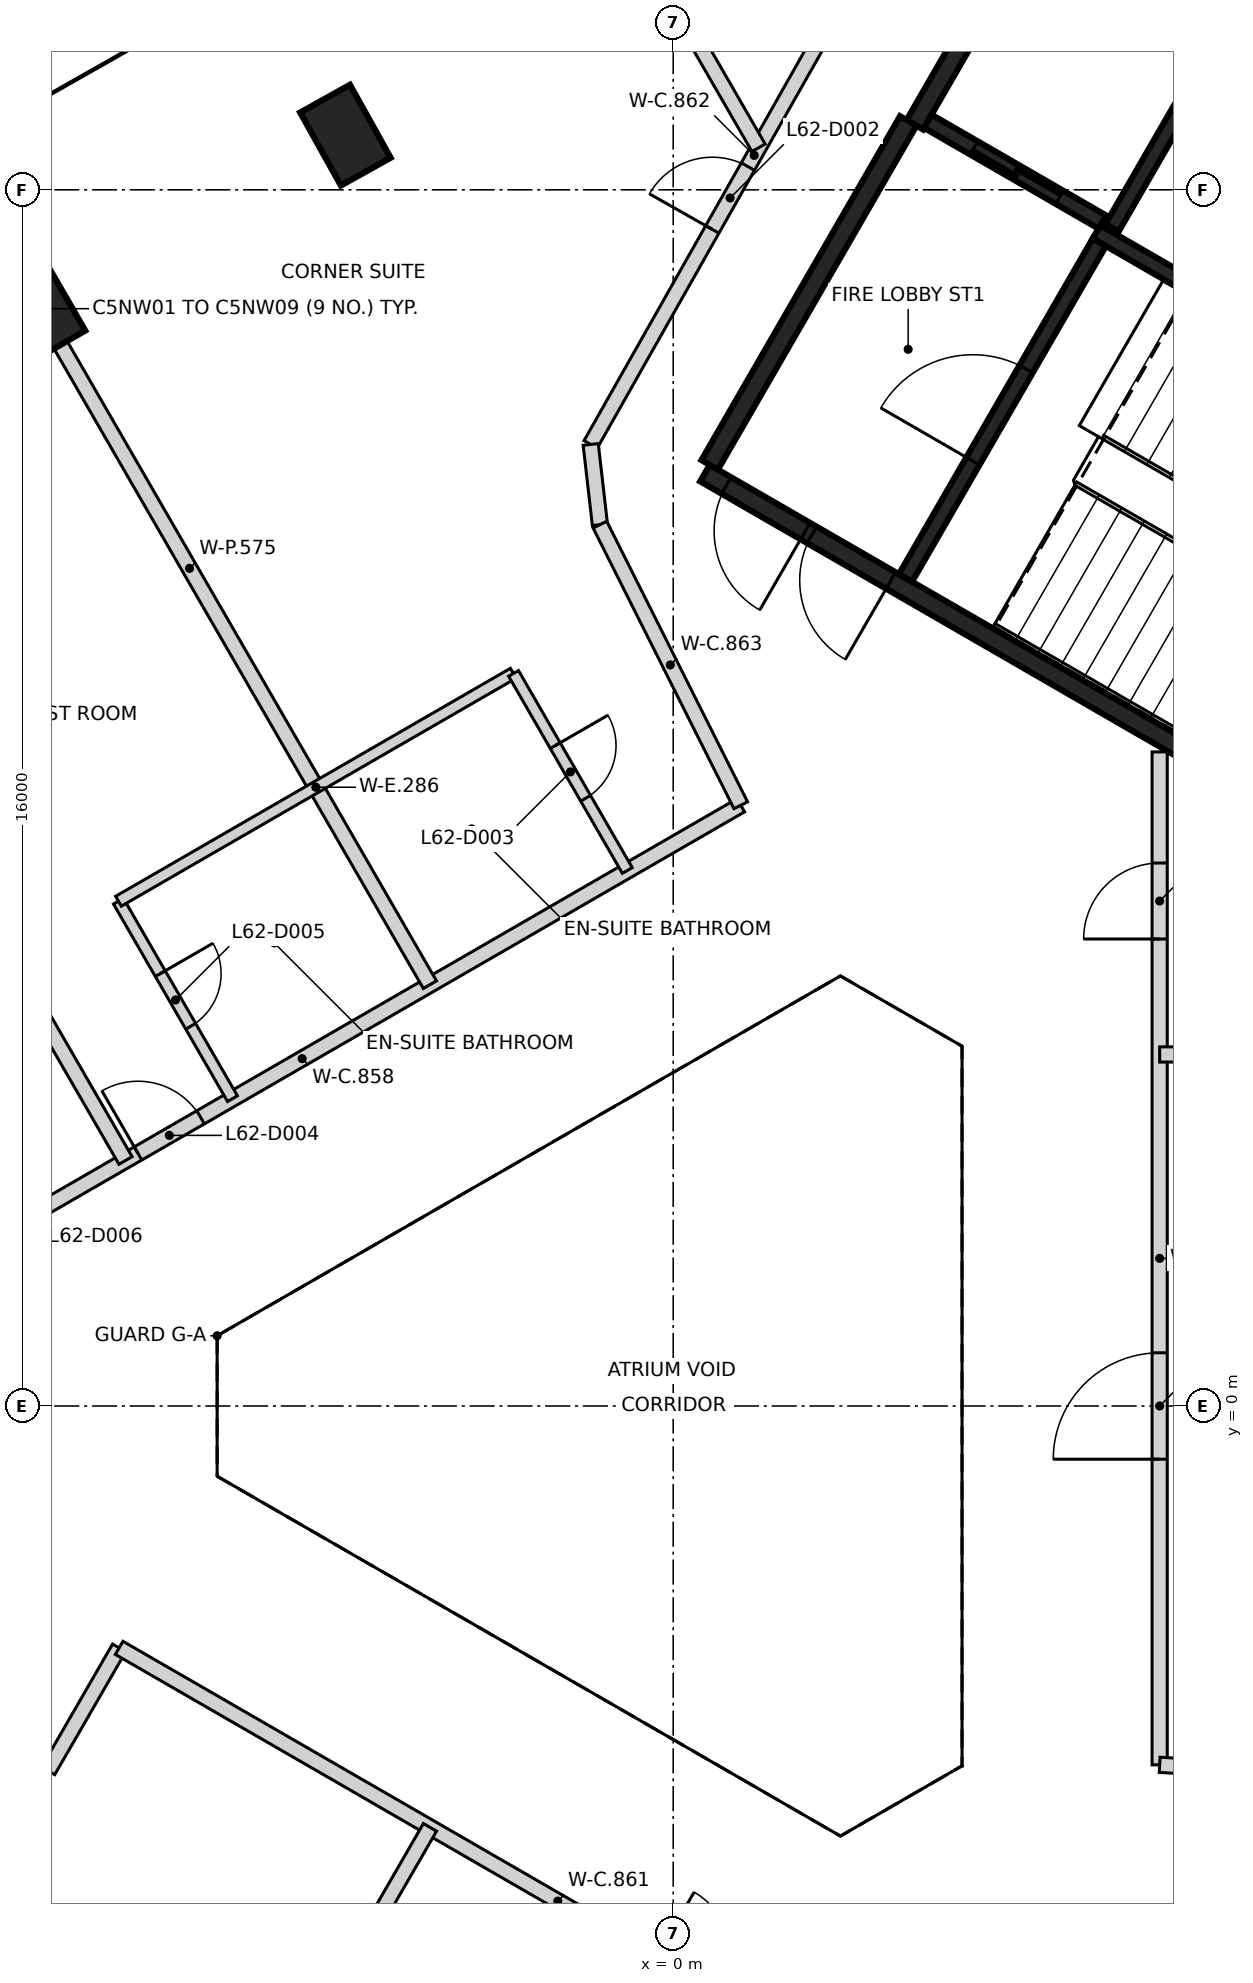
"""IFC4 building model, lengths in metres.
Left out: names, types, materials, properties, quantities, classifications, styles, units other than length and angle.
Written with IfcOpenShell. Run it as: python <this file> out.ifc"""

import sys

from ifc_helpers import new_model, si_unit, direction, frame, frame_2d, origin, origin_2d, place, context, subcontext, project, spatial, rectangle, extrude, element, fill, save


model = new_model("IFC4")
c1 = context("Model", 3, precision=1e-05, world=origin(), true_north=direction((0.0, 1.0)))
c2 = subcontext(c1, "Body", "Model", "MODEL_VIEW")
j1 = project(units=[si_unit("LENGTHUNIT", "METRE"), si_unit("PLANEANGLEUNIT", "RADIAN")], contexts=[c1])
p1 = place(None, origin())
s1 = spatial("IfcSite", under=j1, at=p1, CompositionType="ELEMENT")
p2 = place(p1, origin())
s2 = spatial("IfcBuilding", under=s1, at=p2, CompositionType="ELEMENT")
p3 = place(p2, frame((0.0, 0.0, 246.6)))
s3 = spatial("IfcBuildingStorey", under=s2, at=p3, CompositionType="ELEMENT", Elevation=246.6)
for number, where, z_axis, x_axis in (
    (1, (-4.312, 16.719, -0.35), (0.0, 0.0, 1.0), (-0.487, 0.873, 0.0)),
    (2, (-8.335, 14.436, -0.35), (0.0, 0.0, 1.0), (-0.5, 0.866, 0.0)),
):
    element("IfcColumn", number, at=place(p3, frame(where, z_axis=z_axis, x_axis=x_axis)), inside=s3, PredefinedType="COLUMN", context=c2, shape_type="SweptSolid", body=[
        extrude(rectangle(XDim=1.1, YDim=0.75, at=origin_2d()), origin(), (0.0, 0.0, 1.0), 3.6),
    ])
p4 = place(p3, frame((10.42, 6.498, 0.0), z_axis=(0.0, 0.0, 1.0), x_axis=(-0.866021906294, 0.500006057782, 0.0)))
e3 = element("IfcWall", 3, at=p4, inside=s3, PredefinedType="SHEAR", context=c2, shape_type="SweptSolid", body=[
    extrude(rectangle(XDim=11.55, YDim=0.25, at=frame_2d((5.775, 0.0))), origin(), (0.0, 0.0, 1.0), 3.25),
])
p5 = place(p4, frame((10.025, 0.0, 0.0)))
e4 = element("IfcOpeningElement", 4, at=p5, cuts=e3, PredefinedType="OPENING", context=c2, shape_type="SweptSolid", body=[
    extrude(rectangle(XDim=1.2, YDim=2.1, at=frame_2d((0.6, 1.05))), frame((0.0, 0.135, 0.0), z_axis=(0.0, -1.0, 0.0), x_axis=(1.0, 0.0, 0.0)), (0.0, 0.0, 1.0), 0.27),
])
p6 = place(p4, frame((8.725, 0.0, 0.0)))
e5 = element("IfcOpeningElement", 5, at=p6, cuts=e3, PredefinedType="OPENING", context=c2, shape_type="SweptSolid", body=[
    extrude(rectangle(XDim=1.2, YDim=2.1, at=frame_2d((0.6, 1.05))), frame((0.0, 0.135, 0.0), z_axis=(0.0, -1.0, 0.0), x_axis=(1.0, 0.0, 0.0)), (0.0, 0.0, 1.0), 0.27),
])
p7 = place(p3, frame((6.304, 22.269, 0.0), z_axis=(0.0, 0.0, 1.0), x_axis=(0.866022959057, -0.500004234368, 0.0)))
e6 = element("IfcWall", 6, at=p7, inside=s3, PredefinedType="SHEAR", context=c2, shape_type="SweptSolid", body=[
    extrude(rectangle(XDim=8.75, YDim=0.25, at=frame_2d((4.375, 0.0))), origin(), (0.0, 0.0, 1.0), 3.25),
])
p8 = place(p3, frame((3.179, 16.856, 0.0), z_axis=(0.0, 0.0, 1.0), x_axis=(0.500001955336, 0.866024274868, 0.0)))
e7 = element("IfcWall", 7, at=p8, inside=s3, PredefinedType="SHEAR", context=c2, shape_type="SweptSolid", body=[
    extrude(rectangle(XDim=6.125, YDim=0.25, at=frame_2d((3.062, 0.0))), origin(), (0.0, 0.0, 1.0), 3.25),
])
p9 = place(p8, frame((3.563, 0.0, 0.0)))
e8 = element("IfcOpeningElement", 8, at=p9, cuts=e7, PredefinedType="OPENING", context=c2, shape_type="SweptSolid", body=[
    extrude(rectangle(XDim=1.0, YDim=2.1, at=frame_2d((0.5, 1.05))), frame((0.0, 0.135, 0.0), z_axis=(0.0, -1.0, 0.0), x_axis=(1.0, 0.0, 0.0)), (0.0, 0.0, 1.0), 0.27),
])
p10 = place(p3, frame((0.48, 12.381, 0.0), z_axis=(0.0, 0.0, 1.0), x_axis=(0.49999885962, 0.866026062182, 0.0)))
e9 = element("IfcWall", 9, at=p10, inside=s3, PredefinedType="SHEAR", context=c2, shape_type="SweptSolid", body=[
    extrude(rectangle(XDim=5.225, YDim=0.25, at=frame_2d((2.612, 0.0))), origin(), (0.0, 0.0, 1.0), 3.25),
])
p11 = place(p3, frame((10.743, 12.46, 0.0), z_axis=(0.0, 0.0, 1.0), x_axis=(-0.866018848283, 0.500011354289, 0.0)))
e10 = element("IfcWall", 10, at=p11, inside=s3, PredefinedType="SHEAR", context=c2, shape_type="SweptSolid", body=[
    extrude(rectangle(XDim=5.974, YDim=0.2, at=frame_2d((2.987, 0.0))), origin(), (0.0, 0.0, 1.0), 3.25),
])
p12 = place(p3, frame((3.057, 10.895, 0.0), z_axis=(0.0, 0.0, 1.0), x_axis=(0.500027839223, 0.866009330205, 0.0)))
e11 = element("IfcWall", 11, at=p12, inside=s3, PredefinedType="SHEAR", context=c2, shape_type="SweptSolid", body=[
    extrude(rectangle(XDim=5.098, YDim=0.2, at=frame_2d((2.549, 0.0))), origin(), (0.0, 0.0, 1.0), 3.25),
])
p13 = place(p12, frame((1.774, 0.0, 0.0)))
e12 = element("IfcOpeningElement", 12, at=p13, cuts=e11, PredefinedType="OPENING", context=c2, shape_type="SweptSolid", body=[
    extrude(rectangle(XDim=1.4, YDim=2.1, at=frame_2d((0.7, 1.05))), frame((0.0, 0.11, 0.0), z_axis=(0.0, -1.0, 0.0), x_axis=(1.0, 0.0, 0.0)), (0.0, 0.0, 1.0), 0.22),
])
p14 = place(p3, frame((7.324, 18.187, 0.0), z_axis=(0.0, 0.0, 1.0), x_axis=(-0.499967891604, -0.866043940782, 0.0)))
e13 = element("IfcWall", 13, at=p14, inside=s3, PredefinedType="SHEAR", context=c2, shape_type="SweptSolid", body=[
    extrude(rectangle(XDim=3.1, YDim=0.2, at=frame_2d((1.55, 0.0))), origin(), (0.0, 0.0, 1.0), 3.25),
])
p15 = place(p3, frame((5.646, 15.576, 0.0), z_axis=(0.0, 0.0, 1.0), x_axis=(-0.866018407898, 0.500012117035, 0.0)))
e14 = element("IfcWall", 14, at=p15, inside=s3, PredefinedType="SHEAR", context=c2, shape_type="SweptSolid", body=[
    extrude(rectangle(XDim=2.651, YDim=0.2, at=frame_2d((1.325, 0.0))), origin(), (0.0, 0.0, 1.0), 3.25),
])
p16 = place(p15, frame((0.652, 0.0, 0.0)))
e15 = element("IfcOpeningElement", 15, at=p16, cuts=e14, PredefinedType="OPENING", context=c2, shape_type="SweptSolid", body=[
    extrude(rectangle(XDim=1.3, YDim=2.1, at=frame_2d((0.65, 1.05))), frame((0.0, 0.11, 0.0), z_axis=(0.0, -1.0, 0.0), x_axis=(1.0, 0.0, 0.0)), (0.0, 0.0, 1.0), 0.22),
])
p17 = place(p3, frame((0.417, -12.273, 0.0), z_axis=(0.0, 0.0, 1.0), x_axis=(0.866021906294, 0.500006057782, 0.0)))
e16 = element("IfcWall", 16, at=p17, inside=s3, PredefinedType="SHEAR", context=c2, shape_type="SweptSolid", body=[
    extrude(rectangle(XDim=11.55, YDim=0.25, at=frame_2d((5.775, 0.0))), origin(), (0.0, 0.0, 1.0), 3.25),
])
p18 = place(p17, frame((10.025, 0.0, 0.0)))
e17 = element("IfcOpeningElement", 17, at=p18, cuts=e16, PredefinedType="OPENING", context=c2, shape_type="SweptSolid", body=[
    extrude(rectangle(XDim=1.2, YDim=2.1, at=frame_2d((0.6, 1.05))), frame((0.0, 0.135, 0.0), z_axis=(0.0, -1.0, 0.0), x_axis=(1.0, 0.0, 0.0)), (0.0, 0.0, 1.0), 0.27),
])
p19 = place(p17, frame((8.725, 0.0, 0.0)))
e18 = element("IfcOpeningElement", 18, at=p19, cuts=e16, PredefinedType="OPENING", context=c2, shape_type="SweptSolid", body=[
    extrude(rectangle(XDim=1.2, YDim=2.1, at=frame_2d((0.6, 1.05))), frame((0.0, 0.135, 0.0), z_axis=(0.0, -1.0, 0.0), x_axis=(1.0, 0.0, 0.0)), (0.0, 0.0, 1.0), 0.27),
])
p20 = place(p3, frame((-10.652, 1.237, 0.0), z_axis=(0.0, 0.0, 1.0), x_axis=(0.865922902183, 0.50017749597, 0.0)))
e19 = element("IfcWall", 19, at=p20, inside=s3, PredefinedType="PARTITIONING", context=c2, shape_type="SweptSolid", body=[
    extrude(rectangle(XDim=13.328, YDim=0.2, at=frame_2d((6.664, 0.0))), origin(), (0.0, 0.0, 1.0), 3.25),
])
p21 = place(p20, frame((4.171, 0.0, 0.0)))
e20 = element("IfcOpeningElement", 20, at=p21, cuts=e19, PredefinedType="OPENING", context=c2, shape_type="SweptSolid", body=[
    extrude(rectangle(XDim=0.95, YDim=2.1, at=frame_2d((0.475, 1.05))), frame((0.0, 0.11, 0.0), z_axis=(0.0, -1.0, 0.0), x_axis=(1.0, 0.0, 0.0)), (0.0, 0.0, 1.0), 0.22),
])
p22 = place(p20, frame((1.463, 0.0, 0.0)))
e21 = element("IfcOpeningElement", 21, at=p22, cuts=e19, PredefinedType="OPENING", context=c2, shape_type="SweptSolid", body=[
    extrude(rectangle(XDim=1.0, YDim=2.1, at=frame_2d((0.5, 1.05))), frame((0.0, 0.11, 0.0), z_axis=(0.0, -1.0, 0.0), x_axis=(1.0, 0.0, 0.0)), (0.0, 0.0, 1.0), 0.22),
])
p23 = place(p3, frame((-8.223, -4.8, 0.0), z_axis=(0.0, 0.0, 1.0), x_axis=(0.499835576036, 0.866120313195, 0.0)))
e22 = element("IfcWall", 22, at=p23, inside=s3, PredefinedType="PARTITIONING", context=c2, shape_type="SweptSolid", body=[
    extrude(rectangle(XDim=1.868, YDim=0.2, at=frame_2d((0.934, 0.0))), origin(), (0.0, 0.0, 1.0), 3.25),
])
p24 = place(p3, frame((-7.289, -3.182, 0.0), z_axis=(0.0, 0.0, 1.0), x_axis=(0.865979329032, -0.500079795322, 0.0)))
e23 = element("IfcWall", 23, at=p24, inside=s3, PredefinedType="PARTITIONING", context=c2, shape_type="SweptSolid", body=[
    extrude(rectangle(XDim=13.326, YDim=0.2, at=frame_2d((6.663, 0.0))), origin(), (0.0, 0.0, 1.0), 3.25),
])
p25 = place(p24, frame((8.158, 0.0, 0.0)))
e24 = element("IfcOpeningElement", 24, at=p25, cuts=e23, PredefinedType="OPENING", context=c2, shape_type="SweptSolid", body=[
    extrude(rectangle(XDim=1.0, YDim=2.1, at=frame_2d((0.5, 1.05))), frame((0.0, 0.11, 0.0), z_axis=(0.0, -1.0, 0.0), x_axis=(1.0, 0.0, 0.0)), (0.0, 0.0, 1.0), 0.22),
])
p26 = place(p24, frame((10.865, 0.0, 0.0)))
e25 = element("IfcOpeningElement", 25, at=p26, cuts=e23, PredefinedType="OPENING", context=c2, shape_type="SweptSolid", body=[
    extrude(rectangle(XDim=1.0, YDim=2.1, at=frame_2d((0.5, 1.05))), frame((0.0, 0.11, 0.0), z_axis=(0.0, -1.0, 0.0), x_axis=(1.0, 0.0, 0.0)), (0.0, 0.0, 1.0), 0.22),
])
p27 = place(p3, frame((-1.086, 12.651, 0.0), z_axis=(0.0, 0.0, 1.0), x_axis=(0.492590234691, 0.870261374925, 0.0)))
e26 = element("IfcWall", 26, at=p27, inside=s3, PredefinedType="PARTITIONING", context=c2, shape_type="SweptSolid", body=[
    extrude(rectangle(XDim=8.738, YDim=0.2, at=frame_2d((4.369, 0.0))), origin(), (0.0, 0.0, 1.0), 3.25),
])
p28 = place(p27, frame((6.105, 0.0, 0.0)))
e27 = element("IfcOpeningElement", 27, at=p28, cuts=e26, PredefinedType="OPENING", context=c2, shape_type="SweptSolid", body=[
    extrude(rectangle(XDim=1.0, YDim=2.1, at=frame_2d((0.5, 1.05))), frame((0.0, 0.11, 0.0), z_axis=(0.0, -1.0, 0.0), x_axis=(1.0, 0.0, 0.0)), (0.0, 0.0, 1.0), 0.22),
])
p29 = place(p27, frame((3.25, 0.0, 0.0)))
e28 = element("IfcOpeningElement", 28, at=p29, cuts=e26, PredefinedType="OPENING", context=c2, shape_type="SweptSolid", body=[
    extrude(rectangle(XDim=0.95, YDim=2.1, at=frame_2d((0.475, 1.05))), frame((0.0, 0.11, 0.0), z_axis=(0.0, -1.0, 0.0), x_axis=(1.0, 0.0, 0.0)), (0.0, 0.0, 1.0), 0.22),
])
p30 = place(p3, frame((-1.085, 12.65, 0.0), z_axis=(0.0, 0.0, 1.0), x_axis=(0.113812454263, -0.993502252264, 0.0)))
e29 = element("IfcWall", 29, at=p30, inside=s3, PredefinedType="PARTITIONING", context=c2, shape_type="SweptSolid", body=[
    extrude(rectangle(XDim=1.062, YDim=0.2, at=frame_2d((0.531, 0.0))), origin(), (0.0, 0.0, 1.0), 3.25),
])
p31 = place(p3, frame((-0.964, 11.595, 0.0), z_axis=(0.0, 0.0, 1.0), x_axis=(0.448584236569, -0.893740556706, 0.0)))
e30 = element("IfcWall", 30, at=p31, inside=s3, PredefinedType="PARTITIONING", context=c2, shape_type="SweptSolid", body=[
    extrude(rectangle(XDim=4.131, YDim=0.2, at=frame_2d((2.065, 0.0))), origin(), (0.0, 0.0, 1.0), 3.25),
])
p32 = place(p3, frame((6.4, -4.721, 0.0), z_axis=(0.0, 0.0, 1.0), x_axis=(0.0, 1.0, 0.0)))
e31 = element("IfcWall", 31, at=p32, inside=s3, PredefinedType="PARTITIONING", context=c2, shape_type="SweptSolid", body=[
    extrude(rectangle(XDim=13.326, YDim=0.2, at=frame_2d((6.663, 0.0))), origin(), (0.0, 0.0, 1.0), 3.25),
])
p33 = place(p32, frame((4.021, 0.0, 0.0)))
e32 = element("IfcOpeningElement", 32, at=p33, cuts=e31, PredefinedType="OPENING", context=c2, shape_type="SweptSolid", body=[
    extrude(rectangle(XDim=1.4, YDim=2.1, at=frame_2d((0.7, 1.05))), frame((0.0, 0.11, 0.0), z_axis=(0.0, -1.0, 0.0), x_axis=(1.0, 0.0, 0.0)), (0.0, 0.0, 1.0), 0.22),
])
p34 = place(p32, frame((10.865, 0.0, 0.0)))
e33 = element("IfcOpeningElement", 33, at=p34, cuts=e31, PredefinedType="OPENING", context=c2, shape_type="SweptSolid", body=[
    extrude(rectangle(XDim=1.0, YDim=2.1, at=frame_2d((0.5, 1.05))), frame((0.0, 0.11, 0.0), z_axis=(0.0, -1.0, 0.0), x_axis=(1.0, 0.0, 0.0)), (0.0, 0.0, 1.0), 0.22),
])
p35 = place(p3, frame((6.4, -4.721, 0.0), z_axis=(0.0, 0.0, 1.0), x_axis=(0.998447007366, -0.055709725208, 0.0)))
e34 = element("IfcWall", 34, at=p35, inside=s3, PredefinedType="PARTITIONING", context=c2, shape_type="SweptSolid", body=[
    extrude(rectangle(XDim=4.4, YDim=0.2, at=frame_2d((2.2, 0.0))), origin(), (0.0, 0.0, 1.0), 3.25),
])
p36 = place(p3, frame((-13.513, 14.156, 0.0), z_axis=(0.0, 0.0, 1.0), x_axis=(0.500012240511, -0.866018336607, 0.0)))
e35 = element("IfcWall", 35, at=p36, inside=s3, PredefinedType="PARTITIONING", context=c2, shape_type="SweptSolid", body=[
    extrude(rectangle(XDim=12.616, YDim=0.2, at=frame_2d((6.308, 0.0))), origin(), (0.0, 0.0, 1.0), 3.25),
])
for number, where, z_axis, x_axis in (
    (36, (-9.525, 16.498, 0.0), (0.0, 0.0, 1.0), (0.5, -0.866, 0.0)),
    (37, (-9.525, -16.498, 0.0), (0.0, 0.0, 1.0), (0.5, 0.866, 0.0)),
):
    element("IfcWall", number, at=place(p3, frame(where, z_axis=z_axis, x_axis=x_axis)), inside=s3, PredefinedType="PARTITIONING", context=c2, shape_type="SweptSolid", body=[
        extrude(rectangle(XDim=12.65, YDim=0.2, at=frame_2d((6.325, 0.0))), origin(), (0.0, 0.0, 1.0), 3.25),
    ])
p37 = place(p3, frame((-1.447, 21.005, 0.0), z_axis=(0.0, 0.0, 1.0), x_axis=(0.49988826685, -0.866089903339, 0.0)))
e38 = element("IfcWall", 38, at=p37, inside=s3, PredefinedType="PARTITIONING", context=c2, shape_type="SweptSolid", body=[
    extrude(rectangle(XDim=5.141, YDim=0.2, at=frame_2d((2.57, 0.0))), origin(), (0.0, 0.0, 1.0), 3.25),
])
p38 = place(p3, frame((6.4, 4.625, 0.0), z_axis=(0.0, 0.0, 1.0), x_axis=(1.0, 0.0, 0.0)))
e39 = element("IfcWall", 39, at=p38, inside=s3, PredefinedType="PARTITIONING", context=c2, shape_type="SweptSolid", body=[
    extrude(rectangle(XDim=12.616, YDim=0.2, at=frame_2d((6.308, 0.0))), origin(), (0.0, 0.0, 1.0), 3.25),
])
p39 = place(p3, frame((-7.298, 6.641, 0.0), z_axis=(0.0, 0.0, 1.0), x_axis=(0.499990139034, -0.866031096941, 0.0)))
e40 = element("IfcWall", 40, at=p39, inside=s3, PredefinedType="PARTITIONING", context=c2, shape_type="SweptSolid", body=[
    extrude(rectangle(XDim=3.0, YDim=0.15, at=frame_2d((1.5, 0.0))), origin(), (0.0, 0.0, 1.0), 3.25),
])
p40 = place(p39, frame((1.1, 0.0, 0.0)))
e41 = element("IfcOpeningElement", 41, at=p40, cuts=e40, PredefinedType="OPENING", context=c2, shape_type="SweptSolid", body=[
    extrude(rectangle(XDim=0.8, YDim=2.1, at=frame_2d((0.4, 1.05))), frame((0.0, 0.085, 0.0), z_axis=(0.0, -1.0, 0.0), x_axis=(1.0, 0.0, 0.0)), (0.0, 0.0, 1.0), 0.17),
])
p41 = place(p3, frame((-7.298, 6.641, 0.0), z_axis=(0.0, 0.0, 1.0), x_axis=(0.865999837459, 0.50004427956, 0.0)))
e42 = element("IfcWall", 42, at=p41, inside=s3, PredefinedType="PARTITIONING", context=c2, shape_type="SweptSolid", body=[
    extrude(rectangle(XDim=5.998, YDim=0.15, at=frame_2d((2.999, 0.0))), origin(), (0.0, 0.0, 1.0), 3.25),
])
p42 = place(p3, frame((-2.1, 9.638, 0.0), z_axis=(0.0, 0.0, 1.0), x_axis=(0.499753046638, -0.866167935435, 0.0)))
e43 = element("IfcWall", 43, at=p42, inside=s3, PredefinedType="PARTITIONING", context=c2, shape_type="SweptSolid", body=[
    extrude(rectangle(XDim=2.994, YDim=0.15, at=frame_2d((1.497, 0.0))), origin(), (0.0, 0.0, 1.0), 3.25),
])
p43 = place(p42, frame((1.096, 0.0, 0.0)))
e44 = element("IfcOpeningElement", 44, at=p43, cuts=e43, PredefinedType="OPENING", context=c2, shape_type="SweptSolid", body=[
    extrude(rectangle(XDim=0.8, YDim=2.1, at=frame_2d((0.4, 1.05))), frame((0.0, 0.085, 0.0), z_axis=(0.0, -1.0, 0.0), x_axis=(1.0, 0.0, 0.0)), (0.0, 0.0, 1.0), 0.17),
])
p44 = place(p16, origin())
e45 = element("IfcDoor", 45, at=p44, inside=s3, OperationType="SLIDING_TO_LEFT", PredefinedType="DOOR", context=c2, shape_type="SweptSolid", body=[
    extrude(rectangle(XDim=1.3, YDim=2.1, at=frame_2d((0.65, 1.05))), frame((0.0, 0.025, 0.0), z_axis=(0.0, -1.0, 0.0), x_axis=(1.0, 0.0, 0.0)), (0.0, 0.0, 1.0), 0.05),
])
fill(e15, e45)
p45 = place(p5, origin())
e46 = element("IfcDoor", 46, at=p45, inside=s3, OperationType="SINGLE_SWING_LEFT", PredefinedType="DOOR", context=c2, shape_type="SweptSolid", body=[
    extrude(rectangle(XDim=1.2, YDim=2.1, at=frame_2d((0.6, 1.05))), frame((0.0, 0.025, 0.0), z_axis=(0.0, -1.0, 0.0), x_axis=(1.0, 0.0, 0.0)), (0.0, 0.0, 1.0), 0.05),
])
fill(e4, e46)
p46 = place(p6, origin())
e47 = element("IfcDoor", 47, at=p46, inside=s3, OperationType="SINGLE_SWING_RIGHT", PredefinedType="DOOR", context=c2, shape_type="SweptSolid", body=[
    extrude(rectangle(XDim=1.2, YDim=2.1, at=frame_2d((0.6, 1.05))), frame((0.0, 0.025, 0.0), z_axis=(0.0, -1.0, 0.0), x_axis=(1.0, 0.0, 0.0)), (0.0, 0.0, 1.0), 0.05),
])
fill(e5, e47)
p47 = place(p13, origin())
e48 = element("IfcDoor", 48, at=p47, inside=s3, OperationType="SINGLE_SWING_LEFT", PredefinedType="DOOR", context=c2, shape_type="SweptSolid", body=[
    extrude(rectangle(XDim=1.4, YDim=2.1, at=frame_2d((0.7, 1.05))), frame((0.0, 0.025, 0.0), z_axis=(0.0, -1.0, 0.0), x_axis=(1.0, 0.0, 0.0)), (0.0, 0.0, 1.0), 0.05),
])
fill(e12, e48)
p48 = place(p29, origin())
e49 = element("IfcDoor", 49, at=p48, inside=s3, OperationType="SINGLE_SWING_LEFT", PredefinedType="DOOR", context=c2, shape_type="SweptSolid", body=[
    extrude(rectangle(XDim=0.95, YDim=2.1, at=frame_2d((0.475, 1.05))), frame((0.0, 0.025, 0.0), z_axis=(0.0, -1.0, 0.0), x_axis=(1.0, 0.0, 0.0)), (0.0, 0.0, 1.0), 0.05),
])
fill(e28, e49)
p49 = place(p43, origin())
e50 = element("IfcDoor", 50, at=p49, inside=s3, OperationType="SINGLE_SWING_LEFT", PredefinedType="DOOR", context=c2, shape_type="SweptSolid", body=[
    extrude(rectangle(XDim=0.8, YDim=2.1, at=frame_2d((0.4, 1.05))), frame((0.0, 0.025, 0.0), z_axis=(0.0, -1.0, 0.0), x_axis=(1.0, 0.0, 0.0)), (0.0, 0.0, 1.0), 0.05),
])
fill(e44, e50)
p50 = place(p21, origin())
e51 = element("IfcDoor", 51, at=p50, inside=s3, OperationType="SINGLE_SWING_LEFT", PredefinedType="DOOR", context=c2, shape_type="SweptSolid", body=[
    extrude(rectangle(XDim=0.95, YDim=2.1, at=frame_2d((0.475, 1.05))), frame((0.0, 0.025, 0.0), z_axis=(0.0, -1.0, 0.0), x_axis=(1.0, 0.0, 0.0)), (0.0, 0.0, 1.0), 0.05),
])
fill(e20, e51)
p51 = place(p40, origin())
e52 = element("IfcDoor", 52, at=p51, inside=s3, OperationType="SINGLE_SWING_LEFT", PredefinedType="DOOR", context=c2, shape_type="SweptSolid", body=[
    extrude(rectangle(XDim=0.8, YDim=2.1, at=frame_2d((0.4, 1.05))), frame((0.0, 0.025, 0.0), z_axis=(0.0, -1.0, 0.0), x_axis=(1.0, 0.0, 0.0)), (0.0, 0.0, 1.0), 0.05),
])
fill(e41, e52)
p52 = place(p33, frame((1.4, 0.0, 0.0), z_axis=(0.0, 0.0, 1.0), x_axis=(-1.0, 0.0, 0.0)))
e53 = element("IfcDoor", 53, at=p52, inside=s3, OperationType="DOUBLE_DOOR_SINGLE_SWING", PredefinedType="DOOR", context=c2, shape_type="SweptSolid", body=[
    extrude(rectangle(XDim=1.4, YDim=2.1, at=frame_2d((0.7, 1.05))), frame((0.0, 0.025, 0.0), z_axis=(0.0, -1.0, 0.0), x_axis=(1.0, 0.0, 0.0)), (0.0, 0.0, 1.0), 0.05),
])
fill(e32, e53)
p53 = place(p34, frame((1.0, 0.0, 0.0), z_axis=(0.0, 0.0, 1.0), x_axis=(-1.0, 0.0, 0.0)))
e54 = element("IfcDoor", 54, at=p53, inside=s3, OperationType="SINGLE_SWING_LEFT", PredefinedType="DOOR", context=c2, shape_type="SweptSolid", body=[
    extrude(rectangle(XDim=1.0, YDim=2.1, at=frame_2d((0.5, 1.05))), frame((0.0, 0.025, 0.0), z_axis=(0.0, -1.0, 0.0), x_axis=(1.0, 0.0, 0.0)), (0.0, 0.0, 1.0), 0.05),
])
fill(e33, e54)
save(model, sys.argv[1])
